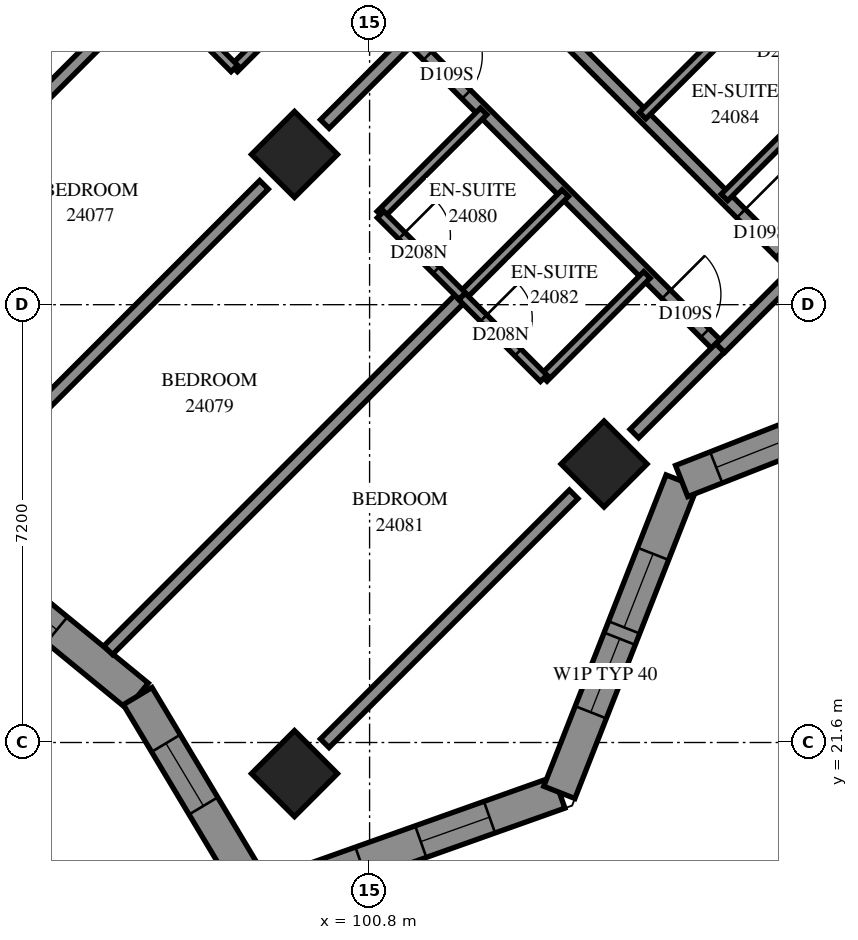
"""IFC4 building model, lengths in metres.
Left out: names, types, materials, properties, quantities, classifications, styles, units other than length and angle.
Written with IfcOpenShell. Run it as: python <this file> out.ifc"""

import sys

from ifc_helpers import new_model, si_unit, direction, frame, frame_2d, origin, origin_2d, place, context, subcontext, project, spatial, polyline, rectangle, outline, extrude, element, fill, save


model = new_model("IFC4")
c1 = context("Model", 3, precision=1e-05, world=origin(), true_north=direction((0.0, 1.0)))
c2 = subcontext(c1, "Body", "Model", "MODEL_VIEW")
j1 = project(units=[si_unit("LENGTHUNIT", "METRE"), si_unit("PLANEANGLEUNIT", "RADIAN")], contexts=[c1])
p1 = place(None, origin())
s1 = spatial("IfcSite", under=j1, at=p1, CompositionType="ELEMENT")
p2 = place(p1, origin())
s2 = spatial("IfcBuilding", under=s1, at=p2, CompositionType="ELEMENT")
p3 = place(p2, frame((0.0, 0.0, 91.4)))
s3 = spatial("IfcBuildingStorey", under=s2, at=p3, CompositionType="ELEMENT", Elevation=91.4)
for number, where, z_axis, x_axis in (
    (1, (99.565, 31.271, 0.0), (0.0, 0.0, 1.0), (0.707, -0.707, 0.0)),
    (2, (104.656, 26.18, 0.0), (0.0, 0.0, 1.0), (0.707, -0.707, 0.0)),
    (3, (99.565, 21.088, 0.0), (0.0, 0.0, 1.0), (0.707, -0.707, 0.0)),
):
    element("IfcColumn", number, at=place(p3, frame(where, z_axis=z_axis, x_axis=x_axis)), inside=s3, PredefinedType="COLUMN", context=c2, shape_type="SweptSolid", body=[
        extrude(rectangle(XDim=1.0, YDim=1.0, at=origin_2d()), origin(), (0.0, 0.0, 1.0), 3.1),
    ])
p4 = place(p3, frame((98.984, 19.025, 0.0), z_axis=(0.0, 0.0, 1.0), x_axis=(0.9422341041, 0.3349550613, 0.0)))
e4 = element("IfcWall", 4, at=p4, inside=s3, PredefinedType="SOLIDWALL", context=c2, shape_type="SweptSolid", body=[
    extrude(outline(polyline([(-0.225, -0.275), (5.364, -0.275), (5.113, 0.275), (0.225, 0.275), (-0.225, -0.275)])), origin(), (0.0, 0.0, 1.0), 3.1),
])
p5 = place(p4, frame((0.576, 0.0, 0.5)))
e5 = element("IfcOpeningElement", 5, at=p5, cuts=e4, PredefinedType="OPENING", context=c2, shape_type="SweptSolid", body=[
    extrude(rectangle(XDim=1.2, YDim=2.45, at=frame_2d((0.6, 1.225))), frame((0.0, 0.285, 0.0), z_axis=(0.0, -1.0, 0.0), x_axis=(1.0, 0.0, 0.0)), (0.0, 0.0, 1.0), 0.57),
])
p6 = place(p4, frame((2.82, 0.0, 0.5)))
e6 = element("IfcOpeningElement", 6, at=p6, cuts=e4, PredefinedType="OPENING", context=c2, shape_type="SweptSolid", body=[
    extrude(rectangle(XDim=1.2, YDim=2.45, at=frame_2d((0.6, 1.225))), frame((0.0, 0.285, 0.0), z_axis=(0.0, -1.0, 0.0), x_axis=(1.0, 0.0, 0.0)), (0.0, 0.0, 1.0), 0.57),
])
p7 = place(p3, frame((103.92, 20.78, 0.0), z_axis=(0.0, 0.0, 1.0), x_axis=(0.3656855561, 0.9307384563, 0.0)))
e7 = element("IfcWall", 7, at=p7, inside=s3, PredefinedType="SOLIDWALL", context=c2, shape_type="SweptSolid", body=[
    extrude(outline(polyline([(-0.125, -0.275), (5.381, -0.275), (5.621, 0.275), (0.125, 0.275), (-0.125, -0.275)])), origin(), (0.0, 0.0, 1.0), 3.1),
])
p8 = place(p7, frame((1.415, 0.0, 0.5)))
e8 = element("IfcOpeningElement", 8, at=p8, cuts=e7, PredefinedType="OPENING", context=c2, shape_type="SweptSolid", body=[
    extrude(rectangle(XDim=1.3, YDim=2.45, at=frame_2d((0.65, 1.225))), frame((0.0, 0.285, 0.0), z_axis=(0.0, -1.0, 0.0), x_axis=(1.0, 0.0, 0.0)), (0.0, 0.0, 1.0), 0.57),
])
p9 = place(p7, frame((2.915, 0.0, 0.5)))
e9 = element("IfcOpeningElement", 9, at=p9, cuts=e7, PredefinedType="OPENING", context=c2, shape_type="SweptSolid", body=[
    extrude(rectangle(XDim=1.3, YDim=2.45, at=frame_2d((0.65, 1.225))), frame((0.0, 0.285, 0.0), z_axis=(0.0, -1.0, 0.0), x_axis=(1.0, 0.0, 0.0)), (0.0, 0.0, 1.0), 0.57),
])
p10 = place(p3, frame((105.932, 25.9, 0.0), z_axis=(0.0, 0.0, 1.0), x_axis=(0.9307322689, 0.3657013038, 0.0)))
e10 = element("IfcWall", 10, at=p10, inside=s3, PredefinedType="SOLIDWALL", context=c2, shape_type="SweptSolid", body=[
    extrude(outline(polyline([(0.12, -0.275), (5.626, -0.275), (5.376, 0.275), (-0.12, 0.275), (0.12, -0.275)])), origin(), (0.0, 0.0, 1.0), 3.1),
])
p11 = place(p10, frame((0.611, 0.0, 0.5)))
e11 = element("IfcOpeningElement", 11, at=p11, cuts=e10, PredefinedType="OPENING", context=c2, shape_type="SweptSolid", body=[
    extrude(rectangle(XDim=1.2, YDim=2.45, at=frame_2d((0.6, 1.225))), frame((0.0, 0.285, 0.0), z_axis=(0.0, -1.0, 0.0), x_axis=(1.0, 0.0, 0.0)), (0.0, 0.0, 1.0), 0.57),
])
p12 = place(p10, frame((3.099, 0.0, 0.5)))
e12 = element("IfcOpeningElement", 12, at=p12, cuts=e10, PredefinedType="OPENING", context=c2, shape_type="SweptSolid", body=[
    extrude(rectangle(XDim=1.2, YDim=2.45, at=frame_2d((0.6, 1.225))), frame((0.0, 0.285, 0.0), z_axis=(0.0, -1.0, 0.0), x_axis=(1.0, 0.0, 0.0)), (0.0, 0.0, 1.0), 0.57),
])
p13 = place(p3, frame((93.904, 24.89, 0.0), z_axis=(0.0, 0.0, 1.0), x_axis=(0.7734013817, -0.6339166371, 0.0)))
e13 = element("IfcWall", 13, at=p13, inside=s3, PredefinedType="SOLIDWALL", context=c2, shape_type="SweptSolid", body=[
    extrude(outline(polyline([(-0.027, -0.275), (3.938, -0.275), (4.033, 0.275), (0.027, 0.275), (-0.027, -0.275)])), origin(), (0.0, 0.0, 1.0), 3.1),
])
p14 = place(p13, frame((1.067, 0.0, 0.5)))
e14 = element("IfcOpeningElement", 14, at=p14, cuts=e13, PredefinedType="OPENING", context=c2, shape_type="SweptSolid", body=[
    extrude(rectangle(XDim=1.2, YDim=2.45, at=frame_2d((0.6, 1.225))), frame((0.0, 0.285, 0.0), z_axis=(0.0, -1.0, 0.0), x_axis=(1.0, 0.0, 0.0)), (0.0, 0.0, 1.0), 0.57),
])
p15 = place(p3, frame((96.986, 22.363, 0.0), z_axis=(0.0, 0.0, 1.0), x_axis=(0.5135466486, -0.8580616759, 0.0)))
e15 = element("IfcWall", 15, at=p15, inside=s3, PredefinedType="SOLIDWALL", context=c2, shape_type="SweptSolid", body=[
    extrude(outline(polyline([(0.048, -0.275), (4.116, -0.275), (3.665, 0.275), (-0.048, 0.275), (0.048, -0.275)])), origin(), (0.0, 0.0, 1.0), 3.1),
])
p16 = place(p15, frame((0.905, 0.0, 0.5)))
e16 = element("IfcOpeningElement", 16, at=p16, cuts=e15, PredefinedType="OPENING", context=c2, shape_type="SweptSolid", body=[
    extrude(rectangle(XDim=1.2, YDim=2.45, at=frame_2d((0.6, 1.225))), frame((0.0, 0.285, 0.0), z_axis=(0.0, -1.0, 0.0), x_axis=(1.0, 0.0, 0.0)), (0.0, 0.0, 1.0), 0.57),
])
p17 = place(p3, frame((93.339, 41.309, 0.0), z_axis=(0.0, 0.0, 1.0), x_axis=(0.7071067812, -0.7071067812, 0.0)))
e17 = element("IfcWall", 17, at=p17, inside=s3, PredefinedType="PARTITIONING", context=c2, shape_type="SweptSolid", body=[
    extrude(rectangle(XDim=18.702, YDim=0.2, at=frame_2d((9.351, 0.0))), origin(), (0.0, 0.0, 1.0), 3.1),
])
p18 = place(p17, frame((3.05, 0.0, 0.0)))
e18 = element("IfcOpeningElement", 18, at=p18, cuts=e17, PredefinedType="OPENING", context=c2, shape_type="SweptSolid", body=[
    extrude(rectangle(XDim=0.9, YDim=2.1, at=frame_2d((0.45, 1.05))), frame((0.0, 0.11, 0.0), z_axis=(0.0, -1.0, 0.0), x_axis=(1.0, 0.0, 0.0)), (0.0, 0.0, 1.0), 0.22),
])
p19 = place(p17, frame((4.7, 0.0, 0.0)))
e19 = element("IfcOpeningElement", 19, at=p19, cuts=e17, PredefinedType="OPENING", context=c2, shape_type="SweptSolid", body=[
    extrude(rectangle(XDim=0.9, YDim=2.1, at=frame_2d((0.45, 1.05))), frame((0.0, 0.11, 0.0), z_axis=(0.0, -1.0, 0.0), x_axis=(1.0, 0.0, 0.0)), (0.0, 0.0, 1.0), 0.22),
])
p20 = place(p17, frame((10.149, 0.0, 0.0)))
e20 = element("IfcOpeningElement", 20, at=p20, cuts=e17, PredefinedType="OPENING", context=c2, shape_type="SweptSolid", body=[
    extrude(rectangle(XDim=0.9, YDim=2.1, at=frame_2d((0.45, 1.05))), frame((0.0, 0.11, 0.0), z_axis=(0.0, -1.0, 0.0), x_axis=(1.0, 0.0, 0.0)), (0.0, 0.0, 1.0), 0.22),
])
p21 = place(p17, frame((11.9, 0.0, 0.0)))
e21 = element("IfcOpeningElement", 21, at=p21, cuts=e17, PredefinedType="OPENING", context=c2, shape_type="SweptSolid", body=[
    extrude(rectangle(XDim=0.9, YDim=2.1, at=frame_2d((0.45, 1.05))), frame((0.0, 0.11, 0.0), z_axis=(0.0, -1.0, 0.0), x_axis=(1.0, 0.0, 0.0)), (0.0, 0.0, 1.0), 0.22),
])
p22 = place(p17, frame((17.45, 0.0, 0.0)))
e22 = element("IfcOpeningElement", 22, at=p22, cuts=e17, PredefinedType="OPENING", context=c2, shape_type="SweptSolid", body=[
    extrude(rectangle(XDim=0.9, YDim=2.1, at=frame_2d((0.45, 1.05))), frame((0.0, 0.11, 0.0), z_axis=(0.0, -1.0, 0.0), x_axis=(1.0, 0.0, 0.0)), (0.0, 0.0, 1.0), 0.22),
])
p23 = place(p3, frame((96.501, 23.117, 0.0), z_axis=(0.0, 0.0, 1.0), x_axis=(0.7071128537, 0.7071007086, 0.0)))
e23 = element("IfcWall", 23, at=p23, inside=s3, PredefinedType="PARTITIONING", context=c2, shape_type="SweptSolid", body=[
    extrude(rectangle(XDim=8.234, YDim=0.2, at=frame_2d((4.117, 0.0))), origin(), (0.0, 0.0, 1.0), 3.1),
])
p24 = place(p3, frame((91.462, 28.254, 0.0), z_axis=(0.0, 0.0, 1.0), x_axis=(0.7072292685, 0.7069842727, 0.0)))
e24 = element("IfcWall", 24, at=p24, inside=s3, PredefinedType="PARTITIONING", context=c2, shape_type="SweptSolid", body=[
    extrude(rectangle(XDim=8.163, YDim=0.2, at=frame_2d((4.082, 0.0))), origin(), (0.0, 0.0, 1.0), 3.1),
])
p25 = place(p3, frame((100.062, 21.588, 0.0), z_axis=(0.0, 0.0, 1.0), x_axis=(0.7071067812, 0.7071067812, 0.0)))
e25 = element("IfcWall", 25, at=p25, inside=s3, PredefinedType="PARTITIONING", context=c2, shape_type="SweptSolid", body=[
    extrude(rectangle(XDim=5.79, YDim=0.2, at=frame_2d((2.895, 0.0))), origin(), (0.0, 0.0, 1.0), 2.6),
])
p26 = place(p3, frame((94.973, 26.681, 0.0), z_axis=(0.0, 0.0, 1.0), x_axis=(0.7071067812, 0.7071067812, 0.0)))
e26 = element("IfcWall", 26, at=p26, inside=s3, PredefinedType="PARTITIONING", context=c2, shape_type="SweptSolid", body=[
    extrude(rectangle(XDim=5.784, YDim=0.2, at=frame_2d((2.892, 0.0))), origin(), (0.0, 0.0, 1.0), 3.1),
])
p27 = place(p3, frame((104.023, 33.184, 0.0), z_axis=(0.0, 0.0, 1.0), x_axis=(0.7071067812, -0.7071067812, 0.0)))
e27 = element("IfcWall", 27, at=p27, inside=s3, PredefinedType="PARTITIONING", context=c2, shape_type="SweptSolid", body=[
    extrude(rectangle(XDim=5.399, YDim=0.2, at=frame_2d((2.7, 0.0))), origin(), (0.0, 0.0, 1.0), 3.1),
])
p28 = place(p27, frame((4.08, 0.0, 0.0)))
e28 = element("IfcOpeningElement", 28, at=p28, cuts=e27, PredefinedType="OPENING", context=c2, shape_type="SweptSolid", body=[
    extrude(rectangle(XDim=0.9, YDim=2.1, at=frame_2d((0.45, 1.05))), frame((0.0, 0.11, 0.0), z_axis=(0.0, -1.0, 0.0), x_axis=(1.0, 0.0, 0.0)), (0.0, 0.0, 1.0), 0.22),
])
for number, where, z_axis, x_axis in (
    (29, (100.977, 30.281, 0.0), (0.0, 0.0, 1.0), (0.707, 0.707, 0.0)),
    (30, (98.573, 32.685, 0.0), (0.0, 0.0, 1.0), (0.707, 0.707, 0.0)),
):
    element("IfcWall", number, at=place(p3, frame(where, z_axis=z_axis, x_axis=x_axis)), inside=s3, PredefinedType="PARTITIONING", context=c2, shape_type="SweptSolid", body=[
        extrude(rectangle(XDim=2.401, YDim=0.15, at=frame_2d((1.201, 0.0))), origin(), (0.0, 0.0, 1.0), 3.1),
    ])
p29 = place(p3, frame((105.29, 31.91, 0.0), z_axis=(0.0, 0.0, 1.0), x_axis=(0.7075233388, 0.706689978, 0.0)))
e31 = element("IfcWall", 31, at=p29, inside=s3, PredefinedType="PARTITIONING", context=c2, shape_type="SweptSolid", body=[
    extrude(rectangle(XDim=2.4, YDim=0.15, at=frame_2d((1.2, 0.0))), origin(), (0.0, 0.0, 1.0), 3.1),
])
for number, where, z_axis, x_axis in (
    (32, (102.323, 28.939, 0.0), (0.0, 0.0, 1.0), (0.707, 0.707, 0.0)),
    (33, (103.665, 27.595, 0.0), (0.0, 0.0, 1.0), (0.707, 0.707, 0.0)),
    (34, (106.635, 30.565, 0.0), (0.0, 0.0, 1.0), (0.707, 0.707, 0.0)),
):
    element("IfcWall", number, at=place(p3, frame(where, z_axis=z_axis, x_axis=x_axis)), inside=s3, PredefinedType="PARTITIONING", context=c2, shape_type="SweptSolid", body=[
        extrude(rectangle(XDim=2.398, YDim=0.15, at=frame_2d((1.199, 0.0))), origin(), (0.0, 0.0, 1.0), 3.1),
    ])
p30 = place(p3, frame((100.063, 31.771, 0.0), z_axis=(0.0, 0.0, 1.0), x_axis=(0.7071067812, 0.7071067812, 0.0)))
e35 = element("IfcWall", 35, at=p30, inside=s3, PredefinedType="PARTITIONING", context=c2, shape_type="SweptSolid", body=[
    extrude(rectangle(XDim=1.994, YDim=0.2, at=frame_2d((0.997, 0.0))), origin(), (0.0, 0.0, 1.0), 3.1),
])
p31 = place(p3, frame((105.154, 26.68, 0.0), z_axis=(0.0, 0.0, 1.0), x_axis=(0.7071067812, 0.7071067812, 0.0)))
e36 = element("IfcWall", 36, at=p31, inside=s3, PredefinedType="PARTITIONING", context=c2, shape_type="SweptSolid", body=[
    extrude(rectangle(XDim=1.994, YDim=0.2, at=frame_2d((0.997, 0.0))), origin(), (0.0, 0.0, 1.0), 2.6),
])
p32 = place(p3, frame((100.981, 30.283, 0.0), z_axis=(0.0, 0.0, 1.0), x_axis=(0.7076330979, -0.7065800724, 0.0)))
e37 = element("IfcWall", 37, at=p32, inside=s3, PredefinedType="PARTITIONING", context=c2, shape_type="SweptSolid", body=[
    extrude(rectangle(XDim=1.899, YDim=0.15, at=frame_2d((0.95, 0.0))), origin(), (0.0, 0.0, 1.0), 3.1),
])
p33 = place(p32, frame((0.493, 0.0, 0.0)))
e38 = element("IfcOpeningElement", 38, at=p33, cuts=e37, PredefinedType="OPENING", context=c2, shape_type="SweptSolid", body=[
    extrude(rectangle(XDim=0.8, YDim=2.1, at=frame_2d((0.4, 1.05))), frame((0.0, 0.085, 0.0), z_axis=(0.0, -1.0, 0.0), x_axis=(1.0, 0.0, 0.0)), (0.0, 0.0, 1.0), 0.17),
])
p34 = place(p3, frame((97.233, 34.029, 0.0), z_axis=(0.0, 0.0, 1.0), x_axis=(0.7065800724, -0.7076330979, 0.0)))
e39 = element("IfcWall", 39, at=p34, inside=s3, PredefinedType="PARTITIONING", context=c2, shape_type="SweptSolid", body=[
    extrude(rectangle(XDim=1.899, YDim=0.15, at=frame_2d((0.95, 0.0))), origin(), (0.0, 0.0, 1.0), 3.1),
])
p35 = place(p34, frame((0.515, 0.0, 0.0)))
e40 = element("IfcOpeningElement", 40, at=p35, cuts=e39, PredefinedType="OPENING", context=c2, shape_type="SweptSolid", body=[
    extrude(rectangle(XDim=0.8, YDim=2.1, at=frame_2d((0.4, 1.05))), frame((0.0, 0.085, 0.0), z_axis=(0.0, -1.0, 0.0), x_axis=(1.0, 0.0, 0.0)), (0.0, 0.0, 1.0), 0.17),
])
p36 = place(p3, frame((102.321, 28.935, 0.0), z_axis=(0.0, 0.0, 1.0), x_axis=(0.7065800724, -0.7076330979, 0.0)))
e41 = element("IfcWall", 41, at=p36, inside=s3, PredefinedType="PARTITIONING", context=c2, shape_type="SweptSolid", body=[
    extrude(rectangle(XDim=1.899, YDim=0.15, at=frame_2d((0.95, 0.0))), origin(), (0.0, 0.0, 1.0), 3.1),
])
p37 = place(p36, frame((0.501, 0.0, 0.0)))
e42 = element("IfcOpeningElement", 42, at=p37, cuts=e41, PredefinedType="OPENING", context=c2, shape_type="SweptSolid", body=[
    extrude(rectangle(XDim=0.8, YDim=2.1, at=frame_2d((0.4, 1.05))), frame((0.0, 0.085, 0.0), z_axis=(0.0, -1.0, 0.0), x_axis=(1.0, 0.0, 0.0)), (0.0, 0.0, 1.0), 0.17),
])
p38 = place(p3, frame((106.987, 33.602, 0.0), z_axis=(0.0, 0.0, 1.0), x_axis=(0.7065800724, -0.7076330979, 0.0)))
e43 = element("IfcWall", 43, at=p38, inside=s3, PredefinedType="PARTITIONING", context=c2, shape_type="SweptSolid", body=[
    extrude(rectangle(XDim=1.899, YDim=0.15, at=frame_2d((0.95, 0.0))), origin(), (0.0, 0.0, 1.0), 3.1),
])
p39 = place(p38, frame((0.519, 0.0, 0.0)))
e44 = element("IfcOpeningElement", 44, at=p39, cuts=e43, PredefinedType="OPENING", context=c2, shape_type="SweptSolid", body=[
    extrude(rectangle(XDim=0.8, YDim=2.1, at=frame_2d((0.4, 1.05))), frame((0.0, 0.085, 0.0), z_axis=(0.0, -1.0, 0.0), x_axis=(1.0, 0.0, 0.0)), (0.0, 0.0, 1.0), 0.17),
])
p40 = place(p3, frame((106.568, 28.086, 0.0), z_axis=(0.0, 0.0, 1.0), x_axis=(0.7065510983, 0.7076620277, 0.0)))
e45 = element("IfcWall", 45, at=p40, inside=s3, PredefinedType="PARTITIONING", context=c2, shape_type="SweptSolid", body=[
    extrude(rectangle(XDim=1.8, YDim=0.2, at=frame_2d((0.9, 0.0))), origin(), (0.0, 0.0, 1.0), 2.6),
])
p41 = place(p5, origin())
e46 = element("IfcWindow", 46, at=p41, inside=s3, PartitioningType="SINGLE_PANEL", PredefinedType="WINDOW", context=c2, shape_type="SweptSolid", body=[
    extrude(rectangle(XDim=1.2, YDim=2.45, at=frame_2d((0.6, 1.225))), frame((0.0, 0.155, 0.0), z_axis=(0.0, -1.0, 0.0), x_axis=(1.0, 0.0, 0.0)), (0.0, 0.0, 1.0), 0.06),
])
fill(e5, e46)
p42 = place(p6, origin())
e47 = element("IfcWindow", 47, at=p42, inside=s3, PartitioningType="SINGLE_PANEL", PredefinedType="WINDOW", context=c2, shape_type="SweptSolid", body=[
    extrude(rectangle(XDim=1.2, YDim=2.45, at=frame_2d((0.6, 1.225))), frame((0.0, 0.155, 0.0), z_axis=(0.0, -1.0, 0.0), x_axis=(1.0, 0.0, 0.0)), (0.0, 0.0, 1.0), 0.06),
])
fill(e6, e47)
p43 = place(p8, origin())
e48 = element("IfcWindow", 48, at=p43, inside=s3, PartitioningType="SINGLE_PANEL", PredefinedType="WINDOW", context=c2, shape_type="SweptSolid", body=[
    extrude(rectangle(XDim=1.3, YDim=2.45, at=frame_2d((0.65, 1.225))), frame((0.0, 0.155, 0.0), z_axis=(0.0, -1.0, 0.0), x_axis=(1.0, 0.0, 0.0)), (0.0, 0.0, 1.0), 0.06),
])
fill(e8, e48)
p44 = place(p9, origin())
e49 = element("IfcWindow", 49, at=p44, inside=s3, PartitioningType="SINGLE_PANEL", PredefinedType="WINDOW", context=c2, shape_type="SweptSolid", body=[
    extrude(rectangle(XDim=1.3, YDim=2.45, at=frame_2d((0.65, 1.225))), frame((0.0, 0.155, 0.0), z_axis=(0.0, -1.0, 0.0), x_axis=(1.0, 0.0, 0.0)), (0.0, 0.0, 1.0), 0.06),
])
fill(e9, e49)
p45 = place(p11, origin())
e50 = element("IfcWindow", 50, at=p45, inside=s3, PartitioningType="SINGLE_PANEL", PredefinedType="WINDOW", context=c2, shape_type="SweptSolid", body=[
    extrude(rectangle(XDim=1.2, YDim=2.45, at=frame_2d((0.6, 1.225))), frame((0.0, 0.155, 0.0), z_axis=(0.0, -1.0, 0.0), x_axis=(1.0, 0.0, 0.0)), (0.0, 0.0, 1.0), 0.06),
])
fill(e11, e50)
p46 = place(p14, origin())
e51 = element("IfcWindow", 51, at=p46, inside=s3, PartitioningType="SINGLE_PANEL", PredefinedType="WINDOW", context=c2, shape_type="SweptSolid", body=[
    extrude(rectangle(XDim=1.2, YDim=2.45, at=frame_2d((0.6, 1.225))), frame((0.0, 0.155, 0.0), z_axis=(0.0, -1.0, 0.0), x_axis=(1.0, 0.0, 0.0)), (0.0, 0.0, 1.0), 0.06),
])
fill(e14, e51)
p47 = place(p16, origin())
e52 = element("IfcWindow", 52, at=p47, inside=s3, PartitioningType="SINGLE_PANEL", PredefinedType="WINDOW", context=c2, shape_type="SweptSolid", body=[
    extrude(rectangle(XDim=1.2, YDim=2.45, at=frame_2d((0.6, 1.225))), frame((0.0, 0.155, 0.0), z_axis=(0.0, -1.0, 0.0), x_axis=(1.0, 0.0, 0.0)), (0.0, 0.0, 1.0), 0.06),
])
fill(e16, e52)
p48 = place(p21, origin())
e53 = element("IfcDoor", 53, at=p48, inside=s3, OperationType="SINGLE_SWING_RIGHT", PredefinedType="DOOR", context=c2, shape_type="SweptSolid", body=[
    extrude(rectangle(XDim=0.9, YDim=2.1, at=frame_2d((0.45, 1.05))), frame((0.0, 0.025, 0.0), z_axis=(0.0, -1.0, 0.0), x_axis=(1.0, 0.0, 0.0)), (0.0, 0.0, 1.0), 0.05),
])
fill(e21, e53)
p49 = place(p33, origin())
e54 = element("IfcDoor", 54, at=p49, inside=s3, OperationType="SINGLE_SWING_RIGHT", PredefinedType="DOOR", context=c2, shape_type="SweptSolid", body=[
    extrude(rectangle(XDim=0.8, YDim=2.1, at=frame_2d((0.4, 1.05))), frame((0.0, 0.025, 0.0), z_axis=(0.0, -1.0, 0.0), x_axis=(1.0, 0.0, 0.0)), (0.0, 0.0, 1.0), 0.05),
])
fill(e38, e54)
p50 = place(p22, origin())
e55 = element("IfcDoor", 55, at=p50, inside=s3, OperationType="SINGLE_SWING_LEFT", PredefinedType="DOOR", context=c2, shape_type="SweptSolid", body=[
    extrude(rectangle(XDim=0.9, YDim=2.1, at=frame_2d((0.45, 1.05))), frame((0.0, 0.025, 0.0), z_axis=(0.0, -1.0, 0.0), x_axis=(1.0, 0.0, 0.0)), (0.0, 0.0, 1.0), 0.05),
])
fill(e22, e55)
p51 = place(p37, origin())
e56 = element("IfcDoor", 56, at=p51, inside=s3, OperationType="SINGLE_SWING_RIGHT", PredefinedType="DOOR", context=c2, shape_type="SweptSolid", body=[
    extrude(rectangle(XDim=0.8, YDim=2.1, at=frame_2d((0.4, 1.05))), frame((0.0, 0.025, 0.0), z_axis=(0.0, -1.0, 0.0), x_axis=(1.0, 0.0, 0.0)), (0.0, 0.0, 1.0), 0.05),
])
fill(e42, e56)
p52 = place(p28, origin())
e57 = element("IfcDoor", 57, at=p52, inside=s3, OperationType="SINGLE_SWING_RIGHT", PredefinedType="DOOR", context=c2, shape_type="SweptSolid", body=[
    extrude(rectangle(XDim=0.9, YDim=2.1, at=frame_2d((0.45, 1.05))), frame((0.0, 0.025, 0.0), z_axis=(0.0, -1.0, 0.0), x_axis=(1.0, 0.0, 0.0)), (0.0, 0.0, 1.0), 0.05),
])
fill(e28, e57)
p53 = place(p39, origin())
e58 = element("IfcDoor", 58, at=p53, inside=s3, OperationType="SINGLE_SWING_RIGHT", PredefinedType="DOOR", context=c2, shape_type="SweptSolid", body=[
    extrude(rectangle(XDim=0.8, YDim=2.1, at=frame_2d((0.4, 1.05))), frame((0.0, 0.025, 0.0), z_axis=(0.0, -1.0, 0.0), x_axis=(1.0, 0.0, 0.0)), (0.0, 0.0, 1.0), 0.05),
])
fill(e44, e58)
save(model, sys.argv[1])
